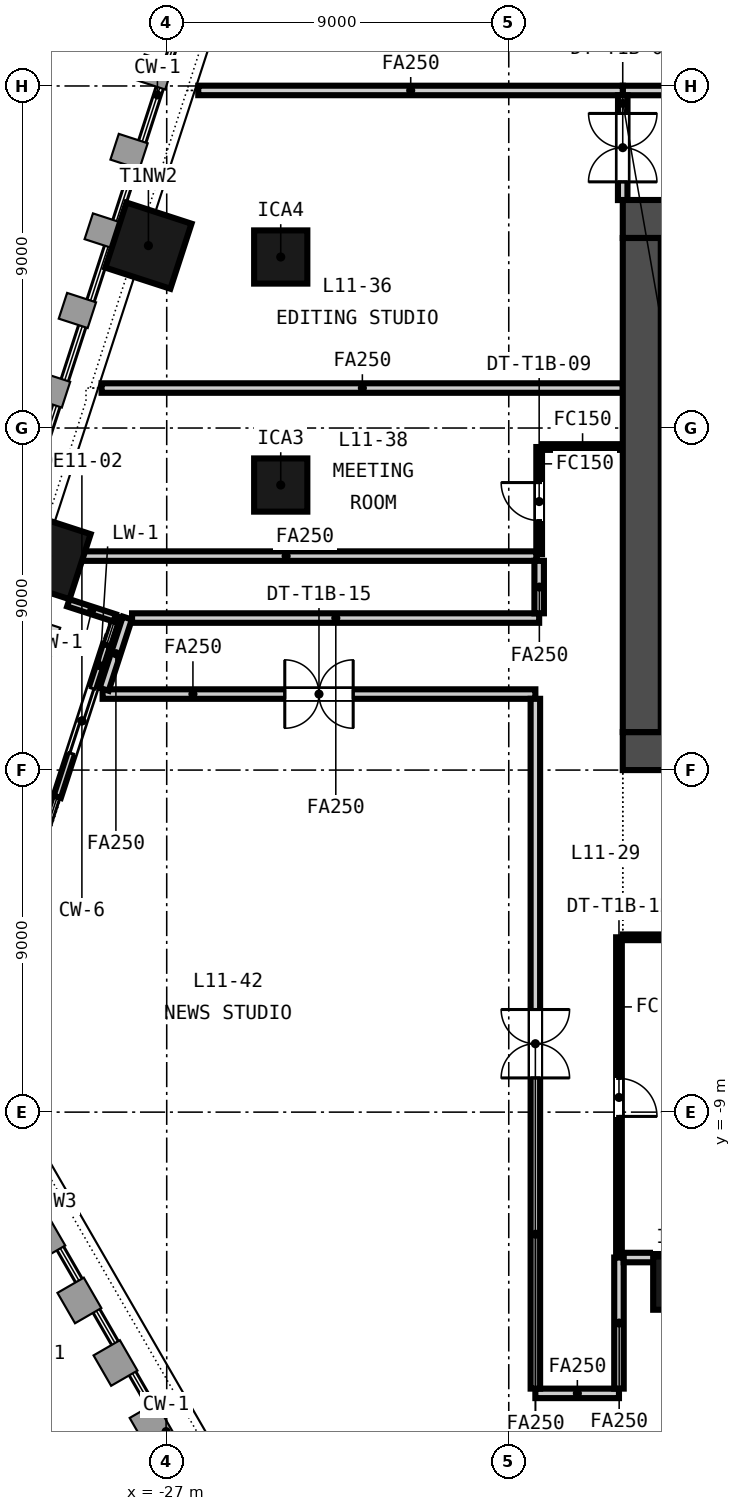
"""IFC4 building model, lengths in metres.
Left out: names, types, materials, properties, quantities, classifications, styles, units other than length and angle.
Written with IfcOpenShell. Run it as: python <this file> out.ifc"""

import sys

from ifc_helpers import new_model, si_unit, direction, frame, frame_2d, origin, origin_2d, place, context, subcontext, project, spatial, rectangle, extrude, element, fill, save


model = new_model("IFC4")
c1 = context("Model", 3, precision=1e-05, world=origin(), true_north=direction((0.0, 1.0)))
c2 = subcontext(c1, "Body", "Model", "MODEL_VIEW")
j1 = project(units=[si_unit("LENGTHUNIT", "METRE"), si_unit("PLANEANGLEUNIT", "RADIAN")], contexts=[c1])
p1 = place(None, origin())
s1 = spatial("IfcSite", under=j1, at=p1, CompositionType="ELEMENT")
p2 = place(p1, origin())
s2 = spatial("IfcBuilding", under=s1, at=p2, CompositionType="ELEMENT")
p3 = place(p2, frame((0.0, 0.0, 54.25)))
s3 = spatial("IfcBuildingStorey", under=s2, at=p3, CompositionType="ELEMENT", Elevation=54.25)
p4 = place(p3, frame((-15.0, 0.5, -0.15), z_axis=(0.0, 0.0, 1.0), x_axis=(1.0, 0.0, 0.0)))
e1 = element("IfcWall", 1, at=p4, inside=s3, PredefinedType="SOLIDWALL", context=c2, shape_type="SweptSolid", body=[
    extrude(rectangle(XDim=30.0, YDim=1.0, at=frame_2d((15.0, 0.0))), origin(), (0.0, 0.0, 1.0), 3.65),
])
p5 = place(p4, frame((5.8, 0.0, 0.15)))
e2 = element("IfcOpeningElement", 2, at=p5, cuts=e1, PredefinedType="OPENING", context=c2, shape_type="SweptSolid", body=[
    extrude(rectangle(XDim=2.4, YDim=2.4, at=frame_2d((1.2, 1.2))), frame((0.0, 0.51, 0.0), z_axis=(0.0, -1.0, 0.0), x_axis=(1.0, 0.0, 0.0)), (0.0, 0.0, 1.0), 1.02),
])
p6 = place(p4, frame((13.8, 0.0, 0.15)))
e3 = element("IfcOpeningElement", 3, at=p6, cuts=e1, PredefinedType="OPENING", context=c2, shape_type="SweptSolid", body=[
    extrude(rectangle(XDim=2.4, YDim=2.4, at=frame_2d((1.2, 1.2))), frame((0.0, 0.51, 0.0), z_axis=(0.0, -1.0, 0.0), x_axis=(1.0, 0.0, 0.0)), (0.0, 0.0, 1.0), 1.02),
])
p7 = place(p4, frame((21.8, 0.0, 0.15)))
e4 = element("IfcOpeningElement", 4, at=p7, cuts=e1, PredefinedType="OPENING", context=c2, shape_type="SweptSolid", body=[
    extrude(rectangle(XDim=2.4, YDim=2.4, at=frame_2d((1.2, 1.2))), frame((0.0, 0.51, 0.0), z_axis=(0.0, -1.0, 0.0), x_axis=(1.0, 0.0, 0.0)), (0.0, 0.0, 1.0), 1.02),
])
p8 = place(p4, frame((1.5, 0.0, 0.15)))
e5 = element("IfcOpeningElement", 5, at=p8, cuts=e1, PredefinedType="OPENING", context=c2, shape_type="SweptSolid", body=[
    extrude(rectangle(XDim=1.2, YDim=2.1, at=frame_2d((0.6, 1.05))), frame((0.0, 0.51, 0.0), z_axis=(0.0, -1.0, 0.0), x_axis=(1.0, 0.0, 0.0)), (0.0, 0.0, 1.0), 1.02),
])
p9 = place(p4, frame((27.3, 0.0, 0.15)))
e6 = element("IfcOpeningElement", 6, at=p9, cuts=e1, PredefinedType="OPENING", context=c2, shape_type="SweptSolid", body=[
    extrude(rectangle(XDim=1.2, YDim=2.1, at=frame_2d((0.6, 1.05))), frame((0.0, 0.51, 0.0), z_axis=(0.0, -1.0, 0.0), x_axis=(1.0, 0.0, 0.0)), (0.0, 0.0, 1.0), 1.02),
])
p10 = place(p3, frame((-15.0, 14.5, -0.15), z_axis=(0.0, 0.0, 1.0), x_axis=(1.0, 0.0, 0.0)))
e7 = element("IfcWall", 7, at=p10, inside=s3, PredefinedType="SOLIDWALL", context=c2, shape_type="SweptSolid", body=[
    extrude(rectangle(XDim=30.0, YDim=1.0, at=frame_2d((15.0, 0.0))), origin(), (0.0, 0.0, 1.0), 3.65),
])
p11 = place(p10, frame((9.25, 0.0, 0.15)))
e8 = element("IfcOpeningElement", 8, at=p11, cuts=e7, PredefinedType="OPENING", context=c2, shape_type="SweptSolid", body=[
    extrude(rectangle(XDim=1.5, YDim=2.1, at=frame_2d((0.75, 1.05))), frame((0.0, 0.51, 0.0), z_axis=(0.0, -1.0, 0.0), x_axis=(1.0, 0.0, 0.0)), (0.0, 0.0, 1.0), 1.02),
])
p12 = place(p10, frame((19.4, 0.0, 0.15)))
e9 = element("IfcOpeningElement", 9, at=p12, cuts=e7, PredefinedType="OPENING", context=c2, shape_type="SweptSolid", body=[
    extrude(rectangle(XDim=1.5, YDim=2.1, at=frame_2d((0.75, 1.05))), frame((0.0, 0.51, 0.0), z_axis=(0.0, -1.0, 0.0), x_axis=(1.0, 0.0, 0.0)), (0.0, 0.0, 1.0), 1.02),
])
p13 = place(p10, frame((1.5, 0.0, 0.15)))
e10 = element("IfcOpeningElement", 10, at=p13, cuts=e7, PredefinedType="OPENING", context=c2, shape_type="SweptSolid", body=[
    extrude(rectangle(XDim=1.2, YDim=2.1, at=frame_2d((0.6, 1.05))), frame((0.0, 0.51, 0.0), z_axis=(0.0, -1.0, 0.0), x_axis=(1.0, 0.0, 0.0)), (0.0, 0.0, 1.0), 1.02),
])
p14 = place(p10, frame((27.3, 0.0, 0.15)))
e11 = element("IfcOpeningElement", 11, at=p14, cuts=e7, PredefinedType="OPENING", context=c2, shape_type="SweptSolid", body=[
    extrude(rectangle(XDim=1.2, YDim=2.1, at=frame_2d((0.6, 1.05))), frame((0.0, 0.51, 0.0), z_axis=(0.0, -1.0, 0.0), x_axis=(1.0, 0.0, 0.0)), (0.0, 0.0, 1.0), 1.02),
])
p15 = place(p3, frame((-14.5, 1.0, -0.15), z_axis=(0.0, 0.0, 1.0), x_axis=(0.0, 1.0, 0.0)))
e12 = element("IfcWall", 12, at=p15, inside=s3, PredefinedType="SOLIDWALL", context=c2, shape_type="SweptSolid", body=[
    extrude(rectangle(XDim=13.0, YDim=1.0, at=frame_2d((6.5, 0.0))), origin(), (0.0, 0.0, 1.0), 3.65),
])
for number, where, z_axis, x_axis in (
    (13, (-27.482, 13.799, -0.15), (0.0, 0.0, 1.0), (-0.309, -0.951, 0.0)),
    (14, (-30.136, 5.63, -0.15), (0.0, 0.0, 1.0), (-0.309, -0.951, 0.0)),
):
    element("IfcColumn", number, at=place(p3, frame(where, z_axis=z_axis, x_axis=x_axis)), inside=s3, PredefinedType="COLUMN", context=c2, shape_type="SweptSolid", body=[
        extrude(rectangle(XDim=1.8, YDim=1.8, at=origin_2d()), origin(), (0.0, 0.0, 1.0), 3.65),
    ])
for number, where, z_axis, x_axis in (
    (15, (-24.0, 7.5, -0.15), (0.0, 0.0, 1.0), (1.0, 0.0, 0.0)),
    (16, (-24.0, 13.5, -0.15), (0.0, 0.0, 1.0), (1.0, 0.0, 0.0)),
    (17, (-13.5, -13.5, -0.15), (0.0, 0.0, 1.0), (1.0, 0.0, 0.0)),
):
    element("IfcColumn", number, at=place(p3, frame(where, z_axis=z_axis, x_axis=x_axis)), inside=s3, PredefinedType="COLUMN", context=c2, shape_type="SweptSolid", body=[
        extrude(rectangle(XDim=1.4, YDim=1.4, at=origin_2d()), origin(), (0.0, 0.0, 1.0), 3.65),
    ])
p16 = place(p3, frame((-28.583, 3.291, 0.0), z_axis=(0.0, 0.0, 1.0), x_axis=(-0.30901640812, -0.951056706781, 0.0)))
e18 = element("IfcWall", 18, at=p16, inside=s3, PredefinedType="SOLIDWALL", context=c2, shape_type="SweptSolid", body=[
    extrude(rectangle(XDim=4.2, YDim=0.2, at=frame_2d((2.1, 0.0))), origin(), (0.0, 0.0, 1.0), 2.9),
])
p17 = place(p16, frame((1.2, 0.0, 0.0)))
e19 = element("IfcOpeningElement", 19, at=p17, cuts=e18, PredefinedType="OPENING", context=c2, shape_type="SweptSolid", body=[
    extrude(rectangle(XDim=1.8, YDim=2.4, at=frame_2d((0.9, 1.2))), frame((0.0, 0.11, 0.0), z_axis=(0.0, -1.0, 0.0), x_axis=(1.0, 0.0, 0.0)), (0.0, 0.0, 1.0), 0.22),
])
p18 = place(p3, frame((-29.589, 4.401, 0.0), z_axis=(0.0, 0.0, 1.0), x_axis=(0.951052235057, -0.30903017036, 0.0)))
e20 = element("IfcWall", 20, at=p18, inside=s3, PredefinedType="SOLIDWALL", context=c2, shape_type="SweptSolid", body=[
    extrude(rectangle(XDim=1.284, YDim=0.2, at=frame_2d((0.642, 0.0))), origin(), (0.0, 0.0, 1.0), 3.05),
])
p19 = place(p3, frame((-9.152, -4.4, 0.0), z_axis=(0.0, 0.0, 1.0), x_axis=(-1.0, 0.0, 0.0)))
e21 = element("IfcWall", 21, at=p19, inside=s3, PredefinedType="PARTITIONING", context=c2, shape_type="SweptSolid", body=[
    extrude(rectangle(XDim=5.848, YDim=0.15, at=frame_2d((2.924, 0.0))), origin(), (0.0, 0.0, 1.0), 2.741),
])
p20 = place(p3, frame((-15.1, -4.4, 0.0), z_axis=(0.0, 0.0, 1.0), x_axis=(0.0, -1.0, 0.0)))
e22 = element("IfcWall", 22, at=p20, inside=s3, PredefinedType="PARTITIONING", context=c2, shape_type="SweptSolid", body=[
    extrude(rectangle(XDim=8.426, YDim=0.15, at=frame_2d((4.213, 0.0))), origin(), (0.0, 0.0, 1.0), 2.741),
])
p21 = place(p20, frame((3.713, 0.0, 0.0)))
e23 = element("IfcOpeningElement", 23, at=p21, cuts=e22, PredefinedType="OPENING", context=c2, shape_type="SweptSolid", body=[
    extrude(rectangle(XDim=1.0, YDim=2.1, at=frame_2d((0.5, 1.05))), frame((0.0, 0.085, 0.0), z_axis=(0.0, -1.0, 0.0), x_axis=(1.0, 0.0, 0.0)), (0.0, 0.0, 1.0), 0.17),
])
p22 = place(p3, frame((-17.3, 2.0, 0.0), z_axis=(0.0, 0.0, 1.0), x_axis=(-1.0, 0.0, 0.0)))
e24 = element("IfcWall", 24, at=p22, inside=s3, PredefinedType="PARTITIONING", context=c2, shape_type="SweptSolid", body=[
    extrude(rectangle(XDim=11.387, YDim=0.25, at=frame_2d((5.693, 0.0))), origin(), (0.0, 0.0, 1.0), 2.741),
])
p23 = place(p22, frame((4.793, 0.0, 0.0)))
e25 = element("IfcOpeningElement", 25, at=p23, cuts=e24, PredefinedType="OPENING", context=c2, shape_type="SweptSolid", body=[
    extrude(rectangle(XDim=1.8, YDim=2.1, at=frame_2d((0.9, 1.05))), frame((0.0, 0.135, 0.0), z_axis=(0.0, -1.0, 0.0), x_axis=(1.0, 0.0, 0.0)), (0.0, 0.0, 1.0), 0.27),
])
p24 = place(p3, frame((-15.1, -16.4, 0.0), z_axis=(0.0, 0.0, 1.0), x_axis=(-1.0, 0.0, 0.0)))
e26 = element("IfcWall", 26, at=p24, inside=s3, PredefinedType="PARTITIONING", context=c2, shape_type="SweptSolid", body=[
    extrude(rectangle(XDim=2.2, YDim=0.25, at=frame_2d((1.1, 0.0))), origin(), (0.0, 0.0, 1.0), 2.741),
])
p25 = place(p3, frame((-15.1, -12.826, 0.0), z_axis=(0.0, 0.0, 1.0), x_axis=(0.0, -1.0, 0.0)))
e27 = element("IfcWall", 27, at=p25, inside=s3, PredefinedType="PARTITIONING", context=c2, shape_type="SweptSolid", body=[
    extrude(rectangle(XDim=3.449, YDim=0.25, at=frame_2d((1.725, 0.0))), origin(), (0.0, 0.0, 1.0), 2.741),
])
p26 = place(p3, frame((-15.0, 17.881, 0.0), z_axis=(0.0, 0.0, 1.0), x_axis=(0.999999975691, -0.000220496356, 0.0)))
e28 = element("IfcWall", 28, at=p26, inside=s3, PredefinedType="PARTITIONING", context=c2, shape_type="SweptSolid", body=[
    extrude(rectangle(XDim=9.965, YDim=0.25, at=frame_2d((4.982, 0.0))), origin(), (0.0, 0.0, 1.0), 2.741),
])
p27 = place(p26, frame((4.083, 0.0, 0.0)))
e29 = element("IfcOpeningElement", 29, at=p27, cuts=e28, PredefinedType="OPENING", context=c2, shape_type="SweptSolid", body=[
    extrude(rectangle(XDim=1.8, YDim=2.1, at=frame_2d((0.9, 1.05))), frame((0.0, 0.135, 0.0), z_axis=(0.0, -1.0, 0.0), x_axis=(1.0, 0.0, 0.0)), (0.0, 0.0, 1.0), 0.27),
])
p28 = place(p3, frame((-26.17, 17.883, 0.0), z_axis=(0.0, 0.0, 1.0), x_axis=(0.999999988296, -0.000152998774, 0.0)))
e30 = element("IfcWall", 30, at=p28, inside=s3, PredefinedType="PARTITIONING", context=c2, shape_type="SweptSolid", body=[
    extrude(rectangle(XDim=11.17, YDim=0.25, at=frame_2d((5.585, 0.0))), origin(), (0.0, 0.0, 1.0), 2.741),
])
p29 = place(p3, frame((-15.002, 14.998, 0.0), z_axis=(0.0, 0.0, 1.0), x_axis=(0.000708152429, 0.99999974926, 0.0)))
e31 = element("IfcWall", 31, at=p29, inside=s3, PredefinedType="PARTITIONING", context=c2, shape_type="SweptSolid", body=[
    extrude(rectangle(XDim=2.758, YDim=0.25, at=frame_2d((1.379, 0.0))), origin(), (0.0, 0.0, 1.0), 2.741),
])
p30 = place(p29, frame((0.479, 0.0, 0.0)))
e32 = element("IfcOpeningElement", 32, at=p30, cuts=e31, PredefinedType="OPENING", context=c2, shape_type="SweptSolid", body=[
    extrude(rectangle(XDim=1.8, YDim=2.1, at=frame_2d((0.9, 1.05))), frame((0.0, 0.135, 0.0), z_axis=(0.0, -1.0, 0.0), x_axis=(1.0, 0.0, 0.0)), (0.0, 0.0, 1.0), 0.27),
])
p31 = place(p3, frame((-28.714, 10.052, 0.0), z_axis=(0.0, 0.0, 1.0), x_axis=(1.0, 0.0, 0.0)))
e33 = element("IfcWall", 33, at=p31, inside=s3, PredefinedType="PARTITIONING", context=c2, shape_type="SweptSolid", body=[
    extrude(rectangle(XDim=13.714, YDim=0.25, at=frame_2d((6.857, 0.0))), origin(), (0.0, 0.0, 1.0), 2.741),
])
p32 = place(p3, frame((-17.2, 5.68, 0.0), z_axis=(0.0, 0.0, 1.0), x_axis=(0.0, 1.0, 0.0)))
e34 = element("IfcWall", 34, at=p32, inside=s3, PredefinedType="PARTITIONING", context=c2, shape_type="SweptSolid", body=[
    extrude(rectangle(XDim=2.82, YDim=0.15, at=frame_2d((1.41, 0.0))), origin(), (0.0, 0.0, 1.0), 2.741),
])
p33 = place(p32, frame((0.885, 0.0, 0.0)))
e35 = element("IfcOpeningElement", 35, at=p33, cuts=e34, PredefinedType="OPENING", context=c2, shape_type="SweptSolid", body=[
    extrude(rectangle(XDim=1.0, YDim=2.1, at=frame_2d((0.5, 1.05))), frame((0.0, 0.085, 0.0), z_axis=(0.0, -1.0, 0.0), x_axis=(1.0, 0.0, 0.0)), (0.0, 0.0, 1.0), 0.17),
])
p34 = place(p3, frame((-17.125, 8.5, 0.0), z_axis=(0.0, 0.0, 1.0), x_axis=(1.0, 0.0, 0.0)))
e36 = element("IfcWall", 36, at=p34, inside=s3, PredefinedType="PARTITIONING", context=c2, shape_type="SweptSolid", body=[
    extrude(rectangle(XDim=2.125, YDim=0.15, at=frame_2d((1.062, 0.0))), origin(), (0.0, 0.0, 1.0), 2.741),
])
p35 = place(p3, frame((-30.451, 5.63, 0.0), z_axis=(0.0, 0.0, 1.0), x_axis=(1.0, 0.0, 0.0)))
e37 = element("IfcWall", 37, at=p35, inside=s3, PredefinedType="PARTITIONING", context=c2, shape_type="SweptSolid", body=[
    extrude(rectangle(XDim=13.176, YDim=0.25, at=frame_2d((6.588, 0.0))), origin(), (0.0, 0.0, 1.0), 2.741),
])
p36 = place(p3, frame((-14.975, -12.826, 0.0), z_axis=(0.0, 0.0, 1.0), x_axis=(1.0, 0.0, 0.0)))
e38 = element("IfcWall", 38, at=p36, inside=s3, PredefinedType="PARTITIONING", context=c2, shape_type="SweptSolid", body=[
    extrude(rectangle(XDim=5.825, YDim=0.25, at=frame_2d((2.913, 0.0))), origin(), (0.0, 0.0, 1.0), 2.741),
])
p37 = place(p3, frame((-28.646, 2.125, 0.0), z_axis=(0.0, 0.0, 1.0), x_axis=(0.309086072338, 0.951034068731, 0.0)))
e39 = element("IfcWall", 39, at=p37, inside=s3, PredefinedType="PARTITIONING", context=c2, shape_type="SweptSolid", body=[
    extrude(rectangle(XDim=1.971, YDim=0.25, at=frame_2d((0.986, 0.0))), origin(), (0.0, 0.0, 1.0), 2.741),
])
p38 = place(p3, frame((-27.912, 4.0, 0.0), z_axis=(0.0, 0.0, 1.0), x_axis=(1.0, 0.0, 0.0)))
e40 = element("IfcWall", 40, at=p38, inside=s3, PredefinedType="PARTITIONING", context=c2, shape_type="SweptSolid", body=[
    extrude(rectangle(XDim=10.712, YDim=0.25, at=frame_2d((5.356, 0.0))), origin(), (0.0, 0.0, 1.0), 2.741),
])
p39 = place(p3, frame((-17.2, 4.125, 0.0), z_axis=(0.0, 0.0, 1.0), x_axis=(0.0, 1.0, 0.0)))
e41 = element("IfcWall", 41, at=p39, inside=s3, PredefinedType="PARTITIONING", context=c2, shape_type="SweptSolid", body=[
    extrude(rectangle(XDim=1.38, YDim=0.25, at=frame_2d((0.69, 0.0))), origin(), (0.0, 0.0, 1.0), 2.741),
])
p40 = place(p3, frame((-17.3, -16.275, 0.0), z_axis=(0.0, 0.0, 1.0), x_axis=(0.0, 1.0, 0.0)))
e42 = element("IfcWall", 42, at=p40, inside=s3, PredefinedType="PARTITIONING", context=c2, shape_type="SweptSolid", body=[
    extrude(rectangle(XDim=18.15, YDim=0.25, at=frame_2d((9.075, 0.0))), origin(), (0.0, 0.0, 1.0), 2.741),
])
p41 = place(p40, frame((8.175, 0.0, 0.0)))
e43 = element("IfcOpeningElement", 43, at=p41, cuts=e42, PredefinedType="OPENING", context=c2, shape_type="SweptSolid", body=[
    extrude(rectangle(XDim=1.8, YDim=2.1, at=frame_2d((0.9, 1.05))), frame((0.0, 0.135, 0.0), z_axis=(0.0, -1.0, 0.0), x_axis=(1.0, 0.0, 0.0)), (0.0, 0.0, 1.0), 0.27),
])
p42 = place(p17, origin())
e44 = element("IfcDoor", 44, at=p42, inside=s3, OperationType="SINGLE_SWING_LEFT", PredefinedType="DOOR", context=c2, shape_type="SweptSolid", body=[
    extrude(rectangle(XDim=1.8, YDim=2.4, at=frame_2d((0.9, 1.2))), frame((0.0, 0.025, 0.0), z_axis=(0.0, -1.0, 0.0), x_axis=(1.0, 0.0, 0.0)), (0.0, 0.0, 1.0), 0.05),
])
fill(e19, e44)
p43 = place(p30, origin())
e45 = element("IfcDoor", 45, at=p43, inside=s3, OperationType="DOUBLE_DOOR_DOUBLE_SWING", PredefinedType="DOOR", context=c2, shape_type="SweptSolid", body=[
    extrude(rectangle(XDim=1.8, YDim=2.1, at=frame_2d((0.9, 1.05))), frame((0.0, 0.025, 0.0), z_axis=(0.0, -1.0, 0.0), x_axis=(1.0, 0.0, 0.0)), (0.0, 0.0, 1.0), 0.05),
])
fill(e32, e45)
p44 = place(p33, origin())
e46 = element("IfcDoor", 46, at=p44, inside=s3, OperationType="SINGLE_SWING_RIGHT", PredefinedType="DOOR", context=c2, shape_type="SweptSolid", body=[
    extrude(rectangle(XDim=1.0, YDim=2.1, at=frame_2d((0.5, 1.05))), frame((0.0, 0.025, 0.0), z_axis=(0.0, -1.0, 0.0), x_axis=(1.0, 0.0, 0.0)), (0.0, 0.0, 1.0), 0.05),
])
fill(e35, e46)
p45 = place(p21, origin())
e47 = element("IfcDoor", 47, at=p45, inside=s3, OperationType="SINGLE_SWING_RIGHT", PredefinedType="DOOR", context=c2, shape_type="SweptSolid", body=[
    extrude(rectangle(XDim=1.0, YDim=2.1, at=frame_2d((0.5, 1.05))), frame((0.0, 0.025, 0.0), z_axis=(0.0, -1.0, 0.0), x_axis=(1.0, 0.0, 0.0)), (0.0, 0.0, 1.0), 0.05),
])
fill(e23, e47)
p46 = place(p41, origin())
e48 = element("IfcDoor", 48, at=p46, inside=s3, OperationType="DOUBLE_DOOR_DOUBLE_SWING", PredefinedType="DOOR", context=c2, shape_type="SweptSolid", body=[
    extrude(rectangle(XDim=1.8, YDim=2.1, at=frame_2d((0.9, 1.05))), frame((0.0, 0.025, 0.0), z_axis=(0.0, -1.0, 0.0), x_axis=(1.0, 0.0, 0.0)), (0.0, 0.0, 1.0), 0.05),
])
fill(e43, e48)
p47 = place(p23, origin())
e49 = element("IfcDoor", 49, at=p47, inside=s3, OperationType="DOUBLE_DOOR_DOUBLE_SWING", PredefinedType="DOOR", context=c2, shape_type="SweptSolid", body=[
    extrude(rectangle(XDim=1.8, YDim=2.1, at=frame_2d((0.9, 1.05))), frame((0.0, 0.025, 0.0), z_axis=(0.0, -1.0, 0.0), x_axis=(1.0, 0.0, 0.0)), (0.0, 0.0, 1.0), 0.05),
])
fill(e25, e49)
save(model, sys.argv[1])
